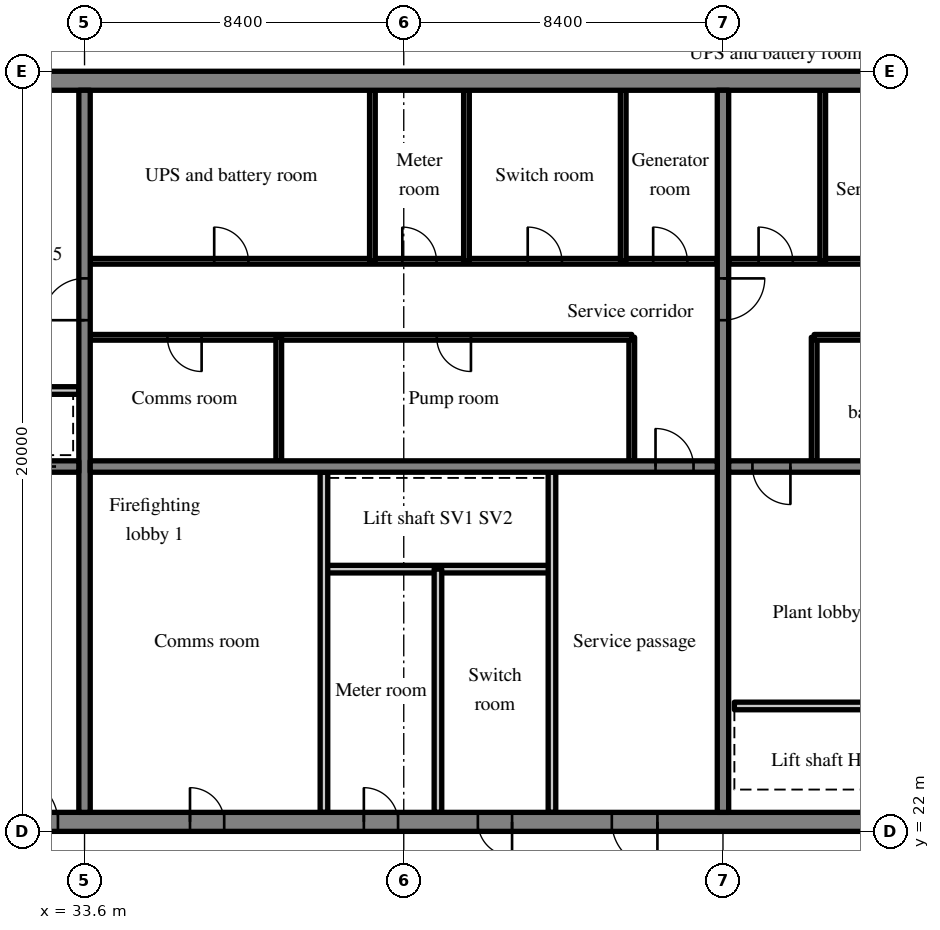
"""IFC4 building model, lengths in metres.
Left out: names, types, materials, properties, quantities, classifications, styles, units other than length and angle.
Written with IfcOpenShell. Run it as: python <this file> out.ifc"""

import sys

from ifc_helpers import new_model, si_unit, direction, frame, frame_2d, origin, place, context, subcontext, project, spatial, rectangle, extrude, source, transform, mapped, element, fill, save


model = new_model("IFC4")
c1 = context("Model", 3, precision=1e-05, world=origin(), true_north=direction((0.0, 1.0)))
c2 = subcontext(c1, "Body", "Model", "MODEL_VIEW")
j1 = project(units=[si_unit("LENGTHUNIT", "METRE"), si_unit("PLANEANGLEUNIT", "RADIAN")], contexts=[c1])
p1 = place(None, origin())
s1 = spatial("IfcSite", under=j1, at=p1, CompositionType="ELEMENT")
p2 = place(p1, origin())
s2 = spatial("IfcBuilding", under=s1, at=p2, CompositionType="ELEMENT")
p3 = place(p2, frame((0.0, 0.0, 270.1)))
s3 = spatial("IfcBuildingStorey", under=s2, at=p3, CompositionType="ELEMENT", Elevation=270.1)
m1 = source(origin(), c2, "Body", "SweptSolid", [
    extrude(rectangle(XDim=50.4, YDim=0.5, at=frame_2d((25.2, 0.0))), origin(), (0.0, 0.0, 1.0), 7.32),
])
p4 = place(p3, frame((25.2, 22.25, 0.0), z_axis=(0.0, 0.0, 1.0), x_axis=(1.0, 0.0, 0.0)))
e1 = element("IfcWall", 1, at=p4, inside=s3, PredefinedType="SHEAR", context=c2, shape_type="MappedRepresentation", body=[
    mapped(m1, transform((0.0, 0.0, 0.0), scale=1.0)),
])
m2 = source(origin(), c2, "Body", "SweptSolid", [
    extrude(rectangle(XDim=1.2, YDim=2.1, at=frame_2d((0.6, 1.05))), frame((0.0, 0.26, 0.0), z_axis=(0.0, -1.0, 0.0), x_axis=(1.0, 0.0, 0.0)), (0.0, 0.0, 1.0), 0.52),
])
p5 = place(p4, frame((22.275, 0.0, 0.0)))
e2 = element("IfcOpeningElement", 2, at=p5, cuts=e1, PredefinedType="OPENING", context=c2, shape_type="MappedRepresentation", body=[
    mapped(m2, transform((0.0, 0.0, 0.0), scale=1.0)),
])
m3 = source(origin(), c2, "Body", "SweptSolid", [
    extrude(rectangle(XDim=0.9, YDim=2.1, at=frame_2d((0.45, 1.05))), frame((0.0, 0.26, 0.0), z_axis=(0.0, -1.0, 0.0), x_axis=(1.0, 0.0, 0.0)), (0.0, 0.0, 1.0), 0.52),
])
p6 = place(p4, frame((15.75, 0.0, 0.0)))
e3 = element("IfcOpeningElement", 3, at=p6, cuts=e1, PredefinedType="OPENING", context=c2, shape_type="MappedRepresentation", body=[
    mapped(m3, transform((0.0, 0.0, 0.0), scale=1.0)),
])
p7 = place(p4, frame((18.75, 0.0, 0.0)))
e4 = element("IfcOpeningElement", 4, at=p7, cuts=e1, PredefinedType="OPENING", context=c2, shape_type="MappedRepresentation", body=[
    mapped(m3, transform((0.0, 0.0, 0.0), scale=1.0)),
])
p8 = place(p4, frame((11.175, 0.0, 0.0)))
e5 = element("IfcOpeningElement", 5, at=p8, cuts=e1, PredefinedType="OPENING", context=c2, shape_type="MappedRepresentation", body=[
    mapped(m3, transform((0.0, 0.0, 0.0), scale=1.0)),
])
m4 = source(origin(), c2, "Body", "SweptSolid", [
    extrude(rectangle(XDim=1.8, YDim=2.1, at=frame_2d((0.9, 1.05))), frame((0.0, 0.26, 0.0), z_axis=(0.0, -1.0, 0.0), x_axis=(1.0, 0.0, 0.0)), (0.0, 0.0, 1.0), 0.52),
])
p9 = place(p4, frame((32.7, 0.0, 0.0)))
e6 = element("IfcOpeningElement", 6, at=p9, cuts=e1, PredefinedType="OPENING", context=c2, shape_type="MappedRepresentation", body=[
    mapped(m4, transform((0.0, 0.0, 0.0), scale=1.0)),
])
p10 = place(p4, frame((6.5, 0.0, 0.0)))
e7 = element("IfcOpeningElement", 7, at=p10, cuts=e1, PredefinedType="OPENING", context=c2, shape_type="MappedRepresentation", body=[
    mapped(m2, transform((0.0, 0.0, 0.0), scale=1.0)),
])
p11 = place(p4, frame((47.975, 0.0, 0.0)))
e8 = element("IfcOpeningElement", 8, at=p11, cuts=e1, PredefinedType="OPENING", context=c2, shape_type="MappedRepresentation", body=[
    mapped(m2, transform((0.0, 0.0, 0.0), scale=1.0)),
])
p12 = place(p3, frame((25.2, 41.75, 0.0), z_axis=(0.0, 0.0, 1.0), x_axis=(1.0, 0.0, 0.0)))
e9 = element("IfcWall", 9, at=p12, inside=s3, PredefinedType="SHEAR", context=c2, shape_type="MappedRepresentation", body=[
    mapped(m1, transform((0.0, 0.0, 0.0), scale=1.0)),
])
m5 = source(origin(), c2, "Body", "SweptSolid", [
    extrude(rectangle(XDim=19.0, YDim=0.3, at=frame_2d((9.5, 0.0))), origin(), (0.0, 0.0, 1.0), 7.32),
])
p13 = place(p3, frame((33.6, 22.5, 0.0), z_axis=(0.0, 0.0, 1.0), x_axis=(0.0, 1.0, 0.0)))
e10 = element("IfcWall", 10, at=p13, inside=s3, PredefinedType="SHEAR", context=c2, shape_type="MappedRepresentation", body=[
    mapped(m5, transform((0.0, 0.0, 0.0), scale=1.0)),
])
m6 = source(origin(), c2, "Body", "SweptSolid", [
    extrude(rectangle(XDim=1.1, YDim=2.1, at=frame_2d((0.55, 1.05))), frame((0.0, 0.16, 0.0), z_axis=(0.0, -1.0, 0.0), x_axis=(1.0, 0.0, 0.0)), (0.0, 0.0, 1.0), 0.32),
])
p14 = place(p13, frame((12.95, 0.0, 0.0)))
e11 = element("IfcOpeningElement", 11, at=p14, cuts=e10, PredefinedType="OPENING", context=c2, shape_type="MappedRepresentation", body=[
    mapped(m6, transform((0.0, 0.0, 0.0), scale=1.0)),
])
p15 = place(p3, frame((50.4, 22.5, 0.0), z_axis=(0.0, 0.0, 1.0), x_axis=(0.0, 1.0, 0.0)))
e12 = element("IfcWall", 12, at=p15, inside=s3, PredefinedType="SHEAR", context=c2, shape_type="MappedRepresentation", body=[
    mapped(m5, transform((0.0, 0.0, 0.0), scale=1.0)),
])
p16 = place(p15, frame((12.95, 0.0, 0.0)))
e13 = element("IfcOpeningElement", 13, at=p16, cuts=e12, PredefinedType="OPENING", context=c2, shape_type="MappedRepresentation", body=[
    mapped(m6, transform((0.0, 0.0, 0.0), scale=1.0)),
])
m7 = source(origin(), c2, "Body", "SweptSolid", [
    extrude(rectangle(XDim=7.75, YDim=0.3, at=frame_2d((3.875, 0.0))), origin(), (0.0, 0.0, 1.0), 7.32),
])
p17 = place(p3, frame((25.7, 31.6, 0.0), z_axis=(0.0, 0.0, 1.0), x_axis=(1.0, 0.0, 0.0)))
e14 = element("IfcWall", 14, at=p17, inside=s3, PredefinedType="SHEAR", context=c2, shape_type="MappedRepresentation", body=[
    mapped(m7, transform((0.0, 0.0, 0.0), scale=1.0)),
])
p18 = place(p17, frame((6.05, 0.0, 0.0)))
e15 = element("IfcOpeningElement", 15, at=p18, cuts=e14, PredefinedType="OPENING", context=c2, shape_type="MappedRepresentation", body=[
    mapped(m6, transform((0.0, 0.0, 0.0), scale=1.0)),
])
m8 = source(origin(), c2, "Body", "SweptSolid", [
    extrude(rectangle(XDim=16.5, YDim=0.3, at=frame_2d((8.25, 0.0))), origin(), (0.0, 0.0, 1.0), 7.32),
])
p19 = place(p3, frame((33.75, 31.6, 0.0), z_axis=(0.0, 0.0, 1.0), x_axis=(1.0, 0.0, 0.0)))
e16 = element("IfcWall", 16, at=p19, inside=s3, PredefinedType="SHEAR", context=c2, shape_type="MappedRepresentation", body=[
    mapped(m8, transform((0.0, 0.0, 0.0), scale=1.0)),
])
m9 = source(origin(), c2, "Body", "SweptSolid", [
    extrude(rectangle(XDim=1.0, YDim=2.1, at=frame_2d((0.5, 1.05))), frame((0.0, 0.16, 0.0), z_axis=(0.0, -1.0, 0.0), x_axis=(1.0, 0.0, 0.0)), (0.0, 0.0, 1.0), 0.32),
])
p20 = place(p19, frame((14.875, 0.0, 0.0)))
e17 = element("IfcOpeningElement", 17, at=p20, cuts=e16, PredefinedType="OPENING", context=c2, shape_type="MappedRepresentation", body=[
    mapped(m9, transform((0.0, 0.0, 0.0), scale=1.0)),
])
p21 = place(p3, frame((50.55, 31.6, 0.0), z_axis=(0.0, 0.0, 1.0), x_axis=(1.0, 0.0, 0.0)))
e18 = element("IfcWall", 18, at=p21, inside=s3, PredefinedType="SHEAR", context=c2, shape_type="MappedRepresentation", body=[
    mapped(m8, transform((0.0, 0.0, 0.0), scale=1.0)),
])
p22 = place(p21, frame((0.625, 0.0, 0.0)))
e19 = element("IfcOpeningElement", 19, at=p22, cuts=e18, PredefinedType="OPENING", context=c2, shape_type="MappedRepresentation", body=[
    mapped(m9, transform((0.0, 0.0, 0.0), scale=1.0)),
])
m10 = source(origin(), c2, "Body", "SweptSolid", [
    extrude(rectangle(XDim=6.0, YDim=0.2, at=frame_2d((3.0, 0.0))), origin(), (0.0, 0.0, 1.0), 7.32),
])
p23 = place(p3, frame((39.9, 28.9, 0.0), z_axis=(0.0, 0.0, 1.0), x_axis=(1.0, 0.0, 0.0)))
e20 = element("IfcWall", 20, at=p23, inside=s3, PredefinedType="SOLIDWALL", context=c2, shape_type="MappedRepresentation", body=[
    mapped(m10, transform((0.0, 0.0, 0.0), scale=1.0)),
])
m11 = source(origin(), c2, "Body", "SweptSolid", [
    extrude(rectangle(XDim=8.95, YDim=0.2, at=frame_2d((4.475, 0.0))), origin(), (0.0, 0.0, 1.0), 7.32),
])
for number, where, z_axis, x_axis in (
    (21, (45.9, 22.5, 0.0), (0.0, 0.0, 1.0), (0.0, 1.0, 0.0)),
    (22, (39.9, 22.5, 0.0), (0.0, 0.0, 1.0), (0.0, 1.0, 0.0)),
):
    element("IfcWall", number, at=place(p3, frame(where, z_axis=z_axis, x_axis=x_axis)), inside=s3, PredefinedType="PARTITIONING", context=c2, shape_type="MappedRepresentation", body=[
        mapped(m11, transform((0.0, 0.0, 0.0), scale=1.0)),
    ])
m12 = source(origin(), c2, "Body", "SweptSolid", [
    extrude(rectangle(XDim=6.4, YDim=0.2, at=frame_2d((3.2, 0.0))), origin(), (0.0, 0.0, 1.0), 7.32),
])
p24 = place(p3, frame((42.9, 22.5, 0.0), z_axis=(0.0, 0.0, 1.0), x_axis=(0.0, 1.0, 0.0)))
e23 = element("IfcWall", 23, at=p24, inside=s3, PredefinedType="PARTITIONING", context=c2, shape_type="MappedRepresentation", body=[
    mapped(m12, transform((0.0, 0.0, 0.0), scale=1.0)),
])
m13 = source(origin(), c2, "Body", "SweptSolid", [
    extrude(rectangle(XDim=3.25, YDim=0.15, at=frame_2d((1.625, 0.0))), origin(), (0.0, 0.0, 1.0), 7.32),
])
p25 = place(p3, frame((48.0, 31.75, 0.0), z_axis=(0.0, 0.0, 1.0), x_axis=(0.0, 1.0, 0.0)))
e24 = element("IfcWall", 24, at=p25, inside=s3, PredefinedType="PARTITIONING", context=c2, shape_type="MappedRepresentation", body=[
    mapped(m13, transform((0.0, 0.0, 0.0), scale=1.0)),
])
m14 = source(origin(), c2, "Body", "SweptSolid", [
    extrude(rectangle(XDim=14.25, YDim=0.15, at=frame_2d((7.125, 0.0))), origin(), (0.0, 0.0, 1.0), 7.32),
])
p26 = place(p3, frame((33.75, 35.0, 0.0), z_axis=(0.0, 0.0, 1.0), x_axis=(1.0, 0.0, 0.0)))
e25 = element("IfcWall", 25, at=p26, inside=s3, PredefinedType="PARTITIONING", context=c2, shape_type="MappedRepresentation", body=[
    mapped(m14, transform((0.0, 0.0, 0.0), scale=1.0)),
])
m15 = source(origin(), c2, "Body", "SweptSolid", [
    extrude(rectangle(XDim=0.9, YDim=2.1, at=frame_2d((0.45, 1.05))), frame((0.0, 0.085, 0.0), z_axis=(0.0, -1.0, 0.0), x_axis=(1.0, 0.0, 0.0)), (0.0, 0.0, 1.0), 0.17),
])
p27 = place(p26, frame((2.031, 0.0, 0.0)))
e26 = element("IfcOpeningElement", 26, at=p27, cuts=e25, PredefinedType="OPENING", context=c2, shape_type="MappedRepresentation", body=[
    mapped(m15, transform((0.0, 0.0, 0.0), scale=1.0)),
])
p28 = place(p26, frame((9.118, 0.0, 0.0)))
e27 = element("IfcOpeningElement", 27, at=p28, cuts=e25, PredefinedType="OPENING", context=c2, shape_type="MappedRepresentation", body=[
    mapped(m15, transform((0.0, 0.0, 0.0), scale=1.0)),
])
m16 = source(origin(), c2, "Body", "SweptSolid", [
    extrude(rectangle(XDim=16.5, YDim=0.15, at=frame_2d((8.25, 0.0))), origin(), (0.0, 0.0, 1.0), 7.32),
])
p29 = place(p3, frame((33.75, 37.0, 0.0), z_axis=(0.0, 0.0, 1.0), x_axis=(1.0, 0.0, 0.0)))
e28 = element("IfcWall", 28, at=p29, inside=s3, PredefinedType="PARTITIONING", context=c2, shape_type="MappedRepresentation", body=[
    mapped(m16, transform((0.0, 0.0, 0.0), scale=1.0)),
])
p30 = place(p29, frame((3.262, 0.0, 0.0)))
e29 = element("IfcOpeningElement", 29, at=p30, cuts=e28, PredefinedType="OPENING", context=c2, shape_type="MappedRepresentation", body=[
    mapped(m15, transform((0.0, 0.0, 0.0), scale=1.0)),
])
p31 = place(p29, frame((8.212, 0.0, 0.0)))
e30 = element("IfcOpeningElement", 30, at=p31, cuts=e28, PredefinedType="OPENING", context=c2, shape_type="MappedRepresentation", body=[
    mapped(m15, transform((0.0, 0.0, 0.0), scale=1.0)),
])
p32 = place(p29, frame((11.512, 0.0, 0.0)))
e31 = element("IfcOpeningElement", 31, at=p32, cuts=e28, PredefinedType="OPENING", context=c2, shape_type="MappedRepresentation", body=[
    mapped(m15, transform((0.0, 0.0, 0.0), scale=1.0)),
])
p33 = place(p29, frame((14.813, 0.0, 0.0)))
e32 = element("IfcOpeningElement", 32, at=p33, cuts=e28, PredefinedType="OPENING", context=c2, shape_type="MappedRepresentation", body=[
    mapped(m15, transform((0.0, 0.0, 0.0), scale=1.0)),
])
p34 = place(p3, frame((38.711, 31.75, 0.0), z_axis=(0.0, 0.0, 1.0), x_axis=(0.0, 1.0, 0.0)))
e33 = element("IfcWall", 33, at=p34, inside=s3, PredefinedType="PARTITIONING", context=c2, shape_type="MappedRepresentation", body=[
    mapped(m13, transform((0.0, 0.0, 0.0), scale=1.0)),
])
m17 = source(origin(), c2, "Body", "SweptSolid", [
    extrude(rectangle(XDim=4.5, YDim=0.15, at=frame_2d((2.25, 0.0))), origin(), (0.0, 0.0, 1.0), 7.32),
])
for number, where, z_axis, x_axis in (
    (34, (41.175, 37.0, 0.0), (0.0, 0.0, 1.0), (0.0, 1.0, 0.0)),
    (35, (43.65, 37.0, 0.0), (0.0, 0.0, 1.0), (0.0, 1.0, 0.0)),
    (36, (47.775, 37.0, 0.0), (0.0, 0.0, 1.0), (0.0, 1.0, 0.0)),
):
    element("IfcWall", number, at=place(p3, frame(where, z_axis=z_axis, x_axis=x_axis)), inside=s3, PredefinedType="PARTITIONING", context=c2, shape_type="MappedRepresentation", body=[
        mapped(m17, transform((0.0, 0.0, 0.0), scale=1.0)),
    ])
p35 = place(p3, frame((56.7, 25.3, 0.0), z_axis=(0.0, 0.0, 1.0), x_axis=(-1.0, 0.0, 0.0)))
e37 = element("IfcWall", 37, at=p35, inside=s3, PredefinedType="SOLIDWALL", context=c2, shape_type="MappedRepresentation", body=[
    mapped(m10, transform((0.0, 0.0, 0.0), scale=1.0)),
])
p36 = place(p3, frame((52.8, 31.75, 0.0), z_axis=(0.0, 0.0, 1.0), x_axis=(0.0, 1.0, 0.0)))
e38 = element("IfcWall", 38, at=p36, inside=s3, PredefinedType="PARTITIONING", context=c2, shape_type="MappedRepresentation", body=[
    mapped(m13, transform((0.0, 0.0, 0.0), scale=1.0)),
])
p37 = place(p3, frame((67.05, 35.0, 0.0), z_axis=(0.0, 0.0, 1.0), x_axis=(-1.0, 0.0, 0.0)))
e39 = element("IfcWall", 39, at=p37, inside=s3, PredefinedType="PARTITIONING", context=c2, shape_type="MappedRepresentation", body=[
    mapped(m14, transform((0.0, 0.0, 0.0), scale=1.0)),
])
p38 = place(p37, frame((0.968, 0.0, 0.0)))
e40 = element("IfcOpeningElement", 40, at=p38, cuts=e39, PredefinedType="OPENING", context=c2, shape_type="MappedRepresentation", body=[
    mapped(m15, transform((0.0, 0.0, 0.0), scale=1.0)),
])
p39 = place(p37, frame((5.929, 0.0, 0.0)))
e41 = element("IfcOpeningElement", 41, at=p39, cuts=e39, PredefinedType="OPENING", context=c2, shape_type="MappedRepresentation", body=[
    mapped(m15, transform((0.0, 0.0, 0.0), scale=1.0)),
])
p40 = place(p37, frame((11.599, 0.0, 0.0)))
e42 = element("IfcOpeningElement", 42, at=p40, cuts=e39, PredefinedType="OPENING", context=c2, shape_type="MappedRepresentation", body=[
    mapped(m15, transform((0.0, 0.0, 0.0), scale=1.0)),
])
p41 = place(p3, frame((67.05, 37.0, 0.0), z_axis=(0.0, 0.0, 1.0), x_axis=(-1.0, 0.0, 0.0)))
e43 = element("IfcWall", 43, at=p41, inside=s3, PredefinedType="PARTITIONING", context=c2, shape_type="MappedRepresentation", body=[
    mapped(m16, transform((0.0, 0.0, 0.0), scale=1.0)),
])
p42 = place(p41, frame((0.788, 0.0, 0.0)))
e44 = element("IfcOpeningElement", 44, at=p42, cuts=e43, PredefinedType="OPENING", context=c2, shape_type="MappedRepresentation", body=[
    mapped(m15, transform((0.0, 0.0, 0.0), scale=1.0)),
])
p43 = place(p41, frame((3.675, 0.0, 0.0)))
e45 = element("IfcOpeningElement", 45, at=p43, cuts=e43, PredefinedType="OPENING", context=c2, shape_type="MappedRepresentation", body=[
    mapped(m15, transform((0.0, 0.0, 0.0), scale=1.0)),
])
p44 = place(p41, frame((9.45, 0.0, 0.0)))
e46 = element("IfcOpeningElement", 46, at=p44, cuts=e43, PredefinedType="OPENING", context=c2, shape_type="MappedRepresentation", body=[
    mapped(m15, transform((0.0, 0.0, 0.0), scale=1.0)),
])
p45 = place(p41, frame((14.813, 0.0, 0.0)))
e47 = element("IfcOpeningElement", 47, at=p45, cuts=e43, PredefinedType="OPENING", context=c2, shape_type="MappedRepresentation", body=[
    mapped(m15, transform((0.0, 0.0, 0.0), scale=1.0)),
])
p46 = place(p3, frame((53.025, 37.0, 0.0), z_axis=(0.0, 0.0, 1.0), x_axis=(0.0, 1.0, 0.0)))
e48 = element("IfcWall", 48, at=p46, inside=s3, PredefinedType="PARTITIONING", context=c2, shape_type="MappedRepresentation", body=[
    mapped(m17, transform((0.0, 0.0, 0.0), scale=1.0)),
])
m18 = source(origin(), c2, "Body", "SweptSolid", [
    extrude(rectangle(XDim=2.3, YDim=0.2, at=frame_2d((1.15, 0.0))), origin(), (0.0, 0.0, 1.0), 7.32),
])
p47 = place(p3, frame((31.15, 33.6, 0.0), z_axis=(0.0, 0.0, 1.0), x_axis=(1.0, 0.0, 0.0)))
e49 = element("IfcWall", 49, at=p47, inside=s3, PredefinedType="SOLIDWALL", context=c2, shape_type="MappedRepresentation", body=[
    mapped(m18, transform((0.0, 0.0, 0.0), scale=1.0)),
])
m19 = source(origin(), c2, "Body", "SweptSolid", [
    extrude(rectangle(XDim=1.2, YDim=2.1, at=frame_2d((0.6, 1.05))), frame((0.0, 0.175, 0.0), z_axis=(0.0, -1.0, 0.0), x_axis=(1.0, 0.0, 0.0)), (0.0, 0.0, 1.0), 0.05),
])
p48 = place(p5, origin())
e50 = element("IfcDoor", 50, at=p48, inside=s3, OperationType="SINGLE_SWING_RIGHT", PredefinedType="DOOR", context=c2, shape_type="MappedRepresentation", body=[
    mapped(m19, transform((0.0, 0.0, 0.0), scale=1.0)),
])
fill(e2, e50)
m20 = source(origin(), c2, "Body", "SweptSolid", [
    extrude(rectangle(XDim=1.0, YDim=2.1, at=frame_2d((0.5, 1.05))), frame((0.0, 0.025, 0.0), z_axis=(0.0, -1.0, 0.0), x_axis=(1.0, 0.0, 0.0)), (0.0, 0.0, 1.0), 0.05),
])
p49 = place(p20, origin())
e51 = element("IfcDoor", 51, at=p49, inside=s3, OperationType="SINGLE_SWING_LEFT", PredefinedType="DOOR", context=c2, shape_type="MappedRepresentation", body=[
    mapped(m20, transform((0.0, 0.0, 0.0), scale=1.0)),
])
fill(e17, e51)
m21 = source(origin(), c2, "Body", "SweptSolid", [
    extrude(rectangle(XDim=0.9, YDim=2.1, at=frame_2d((0.45, 1.05))), frame((0.0, 0.175, 0.0), z_axis=(0.0, -1.0, 0.0), x_axis=(1.0, 0.0, 0.0)), (0.0, 0.0, 1.0), 0.05),
])
p50 = place(p6, origin())
e52 = element("IfcDoor", 52, at=p50, inside=s3, OperationType="SINGLE_SWING_LEFT", PredefinedType="DOOR", context=c2, shape_type="MappedRepresentation", body=[
    mapped(m21, transform((0.0, 0.0, 0.0), scale=1.0)),
])
fill(e3, e52)
p51 = place(p7, origin())
e53 = element("IfcDoor", 53, at=p51, inside=s3, OperationType="SINGLE_SWING_RIGHT", PredefinedType="DOOR", context=c2, shape_type="MappedRepresentation", body=[
    mapped(m21, transform((0.0, 0.0, 0.0), scale=1.0)),
])
fill(e4, e53)
p52 = place(p8, origin())
e54 = element("IfcDoor", 54, at=p52, inside=s3, OperationType="SINGLE_SWING_LEFT", PredefinedType="DOOR", context=c2, shape_type="MappedRepresentation", body=[
    mapped(m21, transform((0.0, 0.0, 0.0), scale=1.0)),
])
fill(e5, e54)
m22 = source(origin(), c2, "Body", "SweptSolid", [
    extrude(rectangle(XDim=0.9, YDim=2.1, at=frame_2d((0.45, 1.05))), frame((0.0, 0.025, 0.0), z_axis=(0.0, -1.0, 0.0), x_axis=(1.0, 0.0, 0.0)), (0.0, 0.0, 1.0), 0.05),
])
p53 = place(p27, origin())
e55 = element("IfcDoor", 55, at=p53, inside=s3, OperationType="SINGLE_SWING_RIGHT", PredefinedType="DOOR", context=c2, shape_type="MappedRepresentation", body=[
    mapped(m22, transform((0.0, 0.0, 0.0), scale=1.0)),
])
fill(e26, e55)
p54 = place(p28, origin())
e56 = element("IfcDoor", 56, at=p54, inside=s3, OperationType="SINGLE_SWING_RIGHT", PredefinedType="DOOR", context=c2, shape_type="MappedRepresentation", body=[
    mapped(m22, transform((0.0, 0.0, 0.0), scale=1.0)),
])
fill(e27, e56)
p55 = place(p30, origin())
e57 = element("IfcDoor", 57, at=p55, inside=s3, OperationType="SINGLE_SWING_LEFT", PredefinedType="DOOR", context=c2, shape_type="MappedRepresentation", body=[
    mapped(m22, transform((0.0, 0.0, 0.0), scale=1.0)),
])
fill(e29, e57)
p56 = place(p31, origin())
e58 = element("IfcDoor", 58, at=p56, inside=s3, OperationType="SINGLE_SWING_LEFT", PredefinedType="DOOR", context=c2, shape_type="MappedRepresentation", body=[
    mapped(m22, transform((0.0, 0.0, 0.0), scale=1.0)),
])
fill(e30, e58)
p57 = place(p32, origin())
e59 = element("IfcDoor", 59, at=p57, inside=s3, OperationType="SINGLE_SWING_LEFT", PredefinedType="DOOR", context=c2, shape_type="MappedRepresentation", body=[
    mapped(m22, transform((0.0, 0.0, 0.0), scale=1.0)),
])
fill(e31, e59)
p58 = place(p33, origin())
e60 = element("IfcDoor", 60, at=p58, inside=s3, OperationType="SINGLE_SWING_LEFT", PredefinedType="DOOR", context=c2, shape_type="MappedRepresentation", body=[
    mapped(m22, transform((0.0, 0.0, 0.0), scale=1.0)),
])
fill(e32, e60)
p59 = place(p22, origin())
e61 = element("IfcDoor", 61, at=p59, inside=s3, OperationType="SINGLE_SWING_RIGHT", PredefinedType="DOOR", context=c2, shape_type="MappedRepresentation", body=[
    mapped(m20, transform((0.0, 0.0, 0.0), scale=1.0)),
])
fill(e19, e61)
p60 = place(p45, origin())
e62 = element("IfcDoor", 62, at=p60, inside=s3, OperationType="SINGLE_SWING_RIGHT", PredefinedType="DOOR", context=c2, shape_type="MappedRepresentation", body=[
    mapped(m22, transform((0.0, 0.0, 0.0), scale=1.0)),
])
fill(e47, e62)
p61 = place(p10, origin())
e63 = element("IfcDoor", 63, at=p61, inside=s3, OperationType="SINGLE_SWING_LEFT", PredefinedType="DOOR", context=c2, shape_type="MappedRepresentation", body=[
    mapped(m19, transform((0.0, 0.0, 0.0), scale=1.0)),
])
fill(e7, e63)
m23 = source(origin(), c2, "Body", "SweptSolid", [
    extrude(rectangle(XDim=1.1, YDim=2.1, at=frame_2d((0.55, 1.05))), frame((0.0, 0.025, 0.0), z_axis=(0.0, -1.0, 0.0), x_axis=(1.0, 0.0, 0.0)), (0.0, 0.0, 1.0), 0.05),
])
p62 = place(p18, origin())
e64 = element("IfcDoor", 64, at=p62, inside=s3, OperationType="SLIDING_TO_LEFT", PredefinedType="DOOR", context=c2, shape_type="MappedRepresentation", body=[
    mapped(m23, transform((0.0, 0.0, 0.0), scale=1.0)),
])
fill(e15, e64)
p63 = place(p14, origin())
e65 = element("IfcDoor", 65, at=p63, inside=s3, OperationType="SINGLE_SWING_LEFT", PredefinedType="DOOR", context=c2, shape_type="MappedRepresentation", body=[
    mapped(m23, transform((0.0, 0.0, 0.0), scale=1.0)),
])
fill(e11, e65)
p64 = place(p16, origin())
e66 = element("IfcDoor", 66, at=p64, inside=s3, OperationType="SINGLE_SWING_RIGHT", PredefinedType="DOOR", context=c2, shape_type="MappedRepresentation", body=[
    mapped(m23, transform((0.0, 0.0, 0.0), scale=1.0)),
])
fill(e13, e66)
save(model, sys.argv[1])
